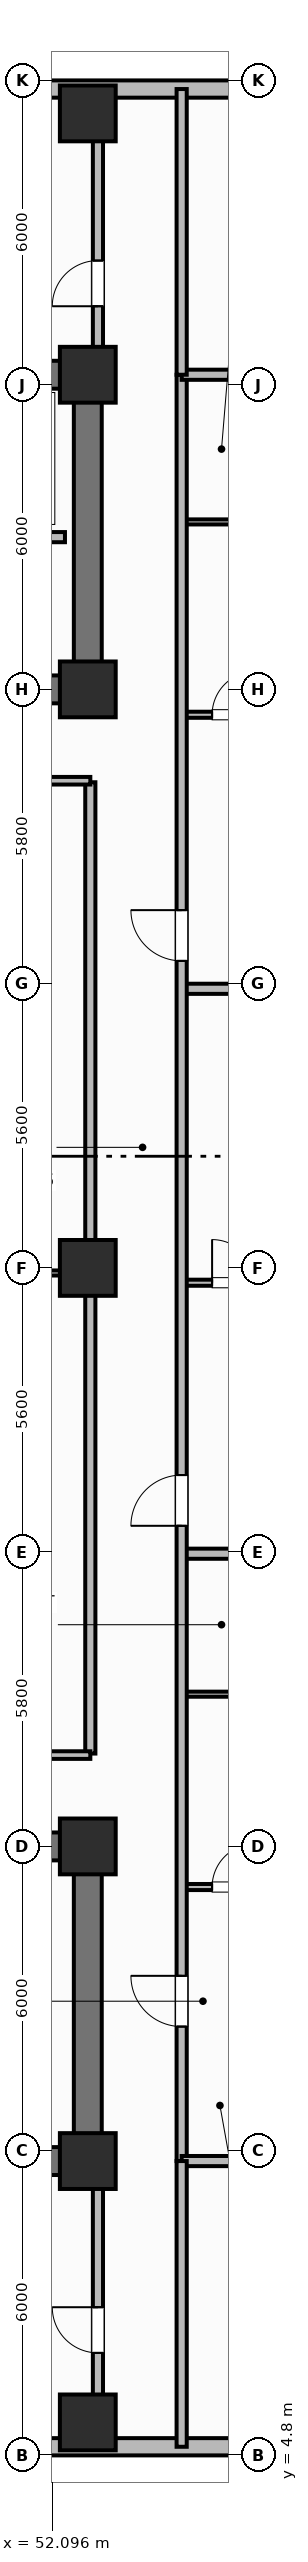
"""IFC4 building model, lengths in metres.
Left out: names, types, materials, properties, quantities, classifications, styles, units other than length and angle.
Written with IfcOpenShell. Run it as: python <this file> out.ifc"""

import sys

from ifc_helpers import new_model, si_unit, direction, frame, frame_2d, origin, origin_2d, place, context, subcontext, project, spatial, rectangle, extrude, element, fill, save


model = new_model("IFC4")
c1 = context("Model", 3, precision=1e-05, world=origin(), true_north=direction((0.0, 1.0)))
c2 = subcontext(c1, "Body", "Model", "MODEL_VIEW")
j1 = project(units=[si_unit("LENGTHUNIT", "METRE"), si_unit("PLANEANGLEUNIT", "RADIAN")], contexts=[c1])
p1 = place(None, origin())
s1 = spatial("IfcSite", under=j1, at=p1, CompositionType="ELEMENT")
p2 = place(p1, origin())
s2 = spatial("IfcBuilding", under=s1, at=p2, CompositionType="ELEMENT")
p3 = place(p2, frame((0.0, 0.0, 125.3)))
s3 = spatial("IfcBuildingStorey", under=s2, at=p3, CompositionType="ELEMENT", Elevation=125.3)
p4 = place(p3, frame((52.8, 10.6, 0.0), z_axis=(0.0, 0.0, 1.0), x_axis=(-1.0, 0.0, 0.0)))
e1 = element("IfcWall", 1, at=p4, inside=s3, PredefinedType="SHEAR", context=c2, shape_type="SweptSolid", body=[
    extrude(rectangle(XDim=27.2, YDim=0.55, at=frame_2d((13.6, 0.0))), origin(), (0.0, 0.0, 1.0), 3.7),
])
p5 = place(p3, frame((52.8, 10.875, 0.0), z_axis=(0.0, 0.0, 1.0), x_axis=(0.0, 1.0, 0.0)))
e2 = element("IfcWall", 2, at=p5, inside=s3, PredefinedType="SHEAR", context=c2, shape_type="SweptSolid", body=[
    extrude(rectangle(XDim=5.65, YDim=0.55, at=frame_2d((2.825, 0.0))), origin(), (0.0, 0.0, 1.0), 3.7),
])
p6 = place(p3, frame((25.6, 16.8, 0.0), z_axis=(0.0, 0.0, 1.0), x_axis=(1.0, 0.0, 0.0)))
e3 = element("IfcWall", 3, at=p6, inside=s3, PredefinedType="SHEAR", context=c2, shape_type="SweptSolid", body=[
    extrude(rectangle(XDim=27.2, YDim=0.55, at=frame_2d((13.6, 0.0))), origin(), (0.0, 0.0, 1.0), 3.7),
])
p7 = place(p6, frame((1.9, 0.0, 0.0)))
e4 = element("IfcOpeningElement", 4, at=p7, cuts=e3, PredefinedType="OPENING", context=c2, shape_type="SweptSolid", body=[
    extrude(rectangle(XDim=1.1, YDim=2.15, at=frame_2d((0.55, 1.075))), frame((0.0, 0.285, 0.0), z_axis=(0.0, -1.0, 0.0), x_axis=(1.0, 0.0, 0.0)), (0.0, 0.0, 1.0), 0.57),
])
p8 = place(p6, frame((13.0, 0.0, 0.0)))
e5 = element("IfcOpeningElement", 5, at=p8, cuts=e3, PredefinedType="OPENING", context=c2, shape_type="SweptSolid", body=[
    extrude(rectangle(XDim=1.2, YDim=2.15, at=frame_2d((0.6, 1.075))), frame((0.0, 0.285, 0.0), z_axis=(0.0, -1.0, 0.0), x_axis=(1.0, 0.0, 0.0)), (0.0, 0.0, 1.0), 0.57),
])
p9 = place(p6, frame((21.6, 0.0, 0.0)))
e6 = element("IfcOpeningElement", 6, at=p9, cuts=e3, PredefinedType="OPENING", context=c2, shape_type="SweptSolid", body=[
    extrude(rectangle(XDim=1.0, YDim=2.15, at=frame_2d((0.5, 1.075))), frame((0.0, 0.285, 0.0), z_axis=(0.0, -1.0, 0.0), x_axis=(1.0, 0.0, 0.0)), (0.0, 0.0, 1.0), 0.57),
])
p10 = place(p3, frame((25.6, 45.8, 0.0), z_axis=(0.0, 0.0, 1.0), x_axis=(1.0, 0.0, 0.0)))
e7 = element("IfcWall", 7, at=p10, inside=s3, PredefinedType="SHEAR", context=c2, shape_type="SweptSolid", body=[
    extrude(rectangle(XDim=27.2, YDim=0.55, at=frame_2d((13.6, 0.0))), origin(), (0.0, 0.0, 1.0), 3.7),
])
p11 = place(p3, frame((52.8, 39.875, 0.0), z_axis=(0.0, 0.0, 1.0), x_axis=(0.0, 1.0, 0.0)))
e8 = element("IfcWall", 8, at=p11, inside=s3, PredefinedType="SHEAR", context=c2, shape_type="SweptSolid", body=[
    extrude(rectangle(XDim=5.65, YDim=0.55, at=frame_2d((2.825, 0.0))), origin(), (0.0, 0.0, 1.0), 3.7),
])
p12 = place(p3, frame((52.8, 39.6, 0.0), z_axis=(0.0, 0.0, 1.0), x_axis=(-1.0, 0.0, 0.0)))
e9 = element("IfcWall", 9, at=p12, inside=s3, PredefinedType="SHEAR", context=c2, shape_type="SweptSolid", body=[
    extrude(rectangle(XDim=27.2, YDim=0.55, at=frame_2d((13.6, 0.0))), origin(), (0.0, 0.0, 1.0), 3.7),
])
p13 = place(p12, frame((24.2, 0.0, 0.0)))
e10 = element("IfcOpeningElement", 10, at=p13, cuts=e9, PredefinedType="OPENING", context=c2, shape_type="SweptSolid", body=[
    extrude(rectangle(XDim=1.1, YDim=2.15, at=frame_2d((0.55, 1.075))), frame((0.0, 0.285, 0.0), z_axis=(0.0, -1.0, 0.0), x_axis=(1.0, 0.0, 0.0)), (0.0, 0.0, 1.0), 0.57),
])
p14 = place(p12, frame((15.1, 0.0, 0.0)))
e11 = element("IfcOpeningElement", 11, at=p14, cuts=e9, PredefinedType="OPENING", context=c2, shape_type="SweptSolid", body=[
    extrude(rectangle(XDim=1.2, YDim=2.15, at=frame_2d((0.6, 1.075))), frame((0.0, 0.285, 0.0), z_axis=(0.0, -1.0, 0.0), x_axis=(1.0, 0.0, 0.0)), (0.0, 0.0, 1.0), 0.57),
])
p15 = place(p12, frame((11.3, 0.0, 0.0)))
e12 = element("IfcOpeningElement", 12, at=p15, cuts=e9, PredefinedType="OPENING", context=c2, shape_type="SweptSolid", body=[
    extrude(rectangle(XDim=1.3, YDim=2.2, at=frame_2d((0.65, 1.1))), frame((0.0, 0.285, 0.0), z_axis=(0.0, -1.0, 0.0), x_axis=(1.0, 0.0, 0.0)), (0.0, 0.0, 1.0), 0.57),
])
p16 = place(p12, frame((7.25, 0.0, 0.0)))
e13 = element("IfcOpeningElement", 13, at=p16, cuts=e9, PredefinedType="OPENING", context=c2, shape_type="SweptSolid", body=[
    extrude(rectangle(XDim=0.85, YDim=2.1, at=frame_2d((0.425, 1.05))), frame((0.0, 0.285, 0.0), z_axis=(0.0, -1.0, 0.0), x_axis=(1.0, 0.0, 0.0)), (0.0, 0.0, 1.0), 0.57),
])
p17 = place(p12, frame((3.0, 0.0, 0.0)))
e14 = element("IfcOpeningElement", 14, at=p17, cuts=e9, PredefinedType="OPENING", context=c2, shape_type="SweptSolid", body=[
    extrude(rectangle(XDim=0.9, YDim=2.1, at=frame_2d((0.45, 1.05))), frame((0.0, 0.285, 0.0), z_axis=(0.0, -1.0, 0.0), x_axis=(1.0, 0.0, 0.0)), (0.0, 0.0, 1.0), 0.57),
])
for number, where, z_axis, x_axis in (
    (15, (52.8, 10.6, 0.0), (0.0, 0.0, 1.0), (1.0, 0.0, 0.0)),
    (16, (52.8, 16.8, 0.0), (0.0, 0.0, 1.0), (1.0, 0.0, 0.0)),
    (17, (52.8, 39.6, 0.0), (0.0, 0.0, 1.0), (1.0, 0.0, 0.0)),
    (18, (52.8, 45.8, 0.0), (0.0, 0.0, 1.0), (1.0, 0.0, 0.0)),
    (19, (52.8, 28.2, 0.0), (0.0, 0.0, 1.0), (1.0, 0.0, 0.0)),
    (20, (52.8, 5.45, 0.0), (0.0, 0.0, 1.0), (1.0, 0.0, 0.0)),
    (21, (52.8, 50.95, 0.0), (0.0, 0.0, 1.0), (1.0, 0.0, 0.0)),
):
    element("IfcColumn", number, at=place(p3, frame(where, z_axis=z_axis, x_axis=x_axis)), inside=s3, PredefinedType="COLUMN", context=c2, shape_type="SweptSolid", body=[
        extrude(rectangle(XDim=1.1, YDim=1.1, at=origin_2d()), origin(), (0.0, 0.0, 1.0), 3.7),
    ])
p18 = place(p3, frame((42.4, 4.97, 0.0), z_axis=(0.0, 0.0, 1.0), x_axis=(1.0, 0.0, 0.0)))
e22 = element("IfcWall", 22, at=p18, inside=s3, PredefinedType="SOLIDWALL", context=c2, shape_type="SweptSolid", body=[
    extrude(rectangle(XDim=17.4, YDim=0.34, at=frame_2d((8.7, 0.0))), origin(), (0.0, 0.0, 1.0), 2.7),
])
p19 = place(p18, frame((5.887, 0.0, 0.68)))
e23 = element("IfcOpeningElement", 23, at=p19, cuts=e22, PredefinedType="OPENING", context=c2, shape_type="SweptSolid", body=[
    extrude(rectangle(XDim=1.6, YDim=1.9, at=frame_2d((0.8, 0.95))), frame((0.0, 0.18, 0.0), z_axis=(0.0, -1.0, 0.0), x_axis=(1.0, 0.0, 0.0)), (0.0, 0.0, 1.0), 0.36),
])
p20 = place(p18, frame((13.938, 0.0, 0.68)))
e24 = element("IfcOpeningElement", 24, at=p20, cuts=e22, PredefinedType="OPENING", context=c2, shape_type="SweptSolid", body=[
    extrude(rectangle(XDim=1.6, YDim=1.9, at=frame_2d((0.8, 0.95))), frame((0.0, 0.18, 0.0), z_axis=(0.0, -1.0, 0.0), x_axis=(1.0, 0.0, 0.0)), (0.0, 0.0, 1.0), 0.36),
])
p21 = place(p3, frame((59.8, 51.43, 0.0), z_axis=(0.0, 0.0, 1.0), x_axis=(-1.0, 0.0, 0.0)))
e25 = element("IfcWall", 25, at=p21, inside=s3, PredefinedType="SOLIDWALL", context=c2, shape_type="SweptSolid", body=[
    extrude(rectangle(XDim=17.4, YDim=0.34, at=frame_2d((8.7, 0.0))), origin(), (0.0, 0.0, 1.0), 2.7),
])
p22 = place(p21, frame((1.613, 0.0, 0.68)))
e26 = element("IfcOpeningElement", 26, at=p22, cuts=e25, PredefinedType="OPENING", context=c2, shape_type="SweptSolid", body=[
    extrude(rectangle(XDim=2.1, YDim=1.9, at=frame_2d((1.05, 0.95))), frame((0.0, 0.18, 0.0), z_axis=(0.0, -1.0, 0.0), x_axis=(1.0, 0.0, 0.0)), (0.0, 0.0, 1.0), 0.36),
])
p23 = place(p21, frame((9.663, 0.0, 0.68)))
e27 = element("IfcOpeningElement", 27, at=p23, cuts=e25, PredefinedType="OPENING", context=c2, shape_type="SweptSolid", body=[
    extrude(rectangle(XDim=2.1, YDim=1.9, at=frame_2d((1.05, 0.95))), frame((0.0, 0.18, 0.0), z_axis=(0.0, -1.0, 0.0), x_axis=(1.0, 0.0, 0.0)), (0.0, 0.0, 1.0), 0.36),
])
p24 = place(p3, frame((52.35, 42.6, 0.0), z_axis=(0.0, 0.0, 1.0), x_axis=(-1.0, 0.0, 0.0)))
e28 = element("IfcWall", 28, at=p24, inside=s3, PredefinedType="PARTITIONING", context=c2, shape_type="SweptSolid", body=[
    extrude(rectangle(XDim=8.8, YDim=0.2, at=frame_2d((4.4, 0.0))), origin(), (0.0, 0.0, 1.0), 2.53),
])
p25 = place(p24, frame((7.1, 0.0, 0.0)))
e29 = element("IfcOpeningElement", 29, at=p25, cuts=e28, PredefinedType="OPENING", context=c2, shape_type="SweptSolid", body=[
    extrude(rectangle(XDim=1.0, YDim=2.15, at=frame_2d((0.5, 1.075))), frame((0.0, 0.11, 0.0), z_axis=(0.0, -1.0, 0.0), x_axis=(1.0, 0.0, 0.0)), (0.0, 0.0, 1.0), 0.22),
])
p26 = place(p3, frame((52.85, 18.63, 0.0), z_axis=(0.0, 0.0, 1.0), x_axis=(0.0, 1.0, 0.0)))
e30 = element("IfcWall", 30, at=p26, inside=s3, PredefinedType="PARTITIONING", context=c2, shape_type="SweptSolid", body=[
    extrude(rectangle(XDim=19.14, YDim=0.2, at=frame_2d((9.57, 0.0))), origin(), (0.0, 0.0, 1.0), 2.53),
])
for number, where, z_axis, x_axis in (
    (31, (46.35, 18.6, 0.0), (0.0, 0.0, 1.0), (1.0, 0.0, 0.0)),
    (32, (46.35, 37.8, 0.0), (0.0, 0.0, 1.0), (1.0, 0.0, 0.0)),
):
    element("IfcWall", number, at=place(p3, frame(where, z_axis=z_axis, x_axis=x_axis)), inside=s3, PredefinedType="PARTITIONING", context=c2, shape_type="SweptSolid", body=[
        extrude(rectangle(XDim=6.5, YDim=0.15, at=frame_2d((3.25, 0.0))), origin(), (0.0, 0.0, 1.0), 2.53),
    ])
p27 = place(p3, frame((46.38, 28.1, 0.0), z_axis=(0.0, 0.0, 1.0), x_axis=(1.0, 0.0, 0.0)))
e33 = element("IfcWall", 33, at=p27, inside=s3, PredefinedType="PARTITIONING", context=c2, shape_type="SweptSolid", body=[
    extrude(rectangle(XDim=6.42, YDim=0.1, at=frame_2d((3.21, 0.0))), origin(), (0.0, 0.0, 1.0), 2.53),
])
p28 = place(p3, frame((54.65, 16.0, 0.0), z_axis=(0.0, 0.0, 1.0), x_axis=(1.0, 0.0, 0.0)))
e34 = element("IfcWall", 34, at=p28, inside=s3, PredefinedType="PARTITIONING", context=c2, shape_type="SweptSolid", body=[
    extrude(rectangle(XDim=2.25, YDim=0.12, at=frame_2d((1.125, 0.0))), origin(), (0.0, 0.0, 1.0), 2.53),
])
p29 = place(p28, frame((0.6, 0.0, 0.0)))
e35 = element("IfcOpeningElement", 35, at=p29, cuts=e34, PredefinedType="OPENING", context=c2, shape_type="SweptSolid", body=[
    extrude(rectangle(XDim=0.85, YDim=2.1, at=frame_2d((0.425, 1.05))), frame((0.0, 0.07, 0.0), z_axis=(0.0, -1.0, 0.0), x_axis=(1.0, 0.0, 0.0)), (0.0, 0.0, 1.0), 0.14),
])
p30 = place(p3, frame((54.65, 19.8, 0.0), z_axis=(0.0, 0.0, 1.0), x_axis=(1.0, 0.0, 0.0)))
e36 = element("IfcWall", 36, at=p30, inside=s3, PredefinedType="PARTITIONING", context=c2, shape_type="SweptSolid", body=[
    extrude(rectangle(XDim=2.25, YDim=0.1, at=frame_2d((1.125, 0.0))), origin(), (0.0, 0.0, 1.0), 2.53),
])
p31 = place(p3, frame((54.65, 22.568, 0.0), z_axis=(0.0, 0.0, 1.0), x_axis=(1.0, 0.0, 0.0)))
e37 = element("IfcWall", 37, at=p31, inside=s3, PredefinedType="PARTITIONING", context=c2, shape_type="SweptSolid", body=[
    extrude(rectangle(XDim=9.18, YDim=0.2, at=frame_2d((4.59, 0.0))), origin(), (0.0, 0.0, 1.0), 2.53),
])
p32 = place(p3, frame((54.65, 27.908, 0.0), z_axis=(0.0, 0.0, 1.0), x_axis=(1.0, 0.0, 0.0)))
e38 = element("IfcWall", 38, at=p32, inside=s3, PredefinedType="PARTITIONING", context=c2, shape_type="SweptSolid", body=[
    extrude(rectangle(XDim=2.25, YDim=0.12, at=frame_2d((1.125, 0.0))), origin(), (0.0, 0.0, 1.0), 2.53),
])
p33 = place(p32, frame((0.6, 0.0, 0.0)))
e39 = element("IfcOpeningElement", 39, at=p33, cuts=e38, PredefinedType="OPENING", context=c2, shape_type="SweptSolid", body=[
    extrude(rectangle(XDim=0.85, YDim=2.1, at=frame_2d((0.425, 1.05))), frame((0.0, 0.07, 0.0), z_axis=(0.0, -1.0, 0.0), x_axis=(1.0, 0.0, 0.0)), (0.0, 0.0, 1.0), 0.14),
])
p34 = place(p3, frame((54.65, 33.7, 0.0), z_axis=(0.0, 0.0, 1.0), x_axis=(1.0, 0.0, 0.0)))
e40 = element("IfcWall", 40, at=p34, inside=s3, PredefinedType="PARTITIONING", context=c2, shape_type="SweptSolid", body=[
    extrude(rectangle(XDim=9.18, YDim=0.2, at=frame_2d((4.59, 0.0))), origin(), (0.0, 0.0, 1.0), 2.53),
])
p35 = place(p3, frame((54.65, 39.1, 0.0), z_axis=(0.0, 0.0, 1.0), x_axis=(1.0, 0.0, 0.0)))
e41 = element("IfcWall", 41, at=p35, inside=s3, PredefinedType="PARTITIONING", context=c2, shape_type="SweptSolid", body=[
    extrude(rectangle(XDim=2.25, YDim=0.12, at=frame_2d((1.125, 0.0))), origin(), (0.0, 0.0, 1.0), 2.53),
])
p36 = place(p35, frame((0.6, 0.0, 0.0)))
e42 = element("IfcOpeningElement", 42, at=p36, cuts=e41, PredefinedType="OPENING", context=c2, shape_type="SweptSolid", body=[
    extrude(rectangle(XDim=0.85, YDim=2.1, at=frame_2d((0.425, 1.05))), frame((0.0, 0.07, 0.0), z_axis=(0.0, -1.0, 0.0), x_axis=(1.0, 0.0, 0.0)), (0.0, 0.0, 1.0), 0.14),
])
p37 = place(p3, frame((54.65, 42.9, 0.0), z_axis=(0.0, 0.0, 1.0), x_axis=(1.0, 0.0, 0.0)))
e43 = element("IfcWall", 43, at=p37, inside=s3, PredefinedType="PARTITIONING", context=c2, shape_type="SweptSolid", body=[
    extrude(rectangle(XDim=2.25, YDim=0.1, at=frame_2d((1.125, 0.0))), origin(), (0.0, 0.0, 1.0), 2.53),
])
p38 = place(p3, frame((54.65, 10.6, 0.0), z_axis=(0.0, 0.0, 1.0), x_axis=(0.0, 1.0, 0.0)))
e44 = element("IfcWall", 44, at=p38, inside=s3, PredefinedType="PARTITIONING", context=c2, shape_type="SweptSolid", body=[
    extrude(rectangle(XDim=35.2, YDim=0.2, at=frame_2d((17.6, 0.0))), origin(), (0.0, 0.0, 1.0), 2.53),
])
p39 = place(p38, frame((2.65, 0.0, 0.0)))
e45 = element("IfcOpeningElement", 45, at=p39, cuts=e44, PredefinedType="OPENING", context=c2, shape_type="SweptSolid", body=[
    extrude(rectangle(XDim=1.0, YDim=2.15, at=frame_2d((0.5, 1.075))), frame((0.0, 0.11, 0.0), z_axis=(0.0, -1.0, 0.0), x_axis=(1.0, 0.0, 0.0)), (0.0, 0.0, 1.0), 0.22),
])
p40 = place(p38, frame((12.518, 0.0, 0.0)))
e46 = element("IfcOpeningElement", 46, at=p40, cuts=e44, PredefinedType="OPENING", context=c2, shape_type="SweptSolid", body=[
    extrude(rectangle(XDim=1.0, YDim=2.15, at=frame_2d((0.5, 1.075))), frame((0.0, 0.11, 0.0), z_axis=(0.0, -1.0, 0.0), x_axis=(1.0, 0.0, 0.0)), (0.0, 0.0, 1.0), 0.22),
])
p41 = place(p38, frame((23.65, 0.0, 0.0)))
e47 = element("IfcOpeningElement", 47, at=p41, cuts=e44, PredefinedType="OPENING", context=c2, shape_type="SweptSolid", body=[
    extrude(rectangle(XDim=1.0, YDim=2.15, at=frame_2d((0.5, 1.075))), frame((0.0, 0.11, 0.0), z_axis=(0.0, -1.0, 0.0), x_axis=(1.0, 0.0, 0.0)), (0.0, 0.0, 1.0), 0.22),
])
for number, where, z_axis, x_axis in (
    (48, (54.65, 10.6, 0.0), (0.0, 0.0, 1.0), (1.0, 0.0, 0.0)),
    (49, (54.65, 45.8, 0.0), (0.0, 0.0, 1.0), (1.0, 0.0, 0.0)),
):
    element("IfcWall", number, at=place(p3, frame(where, z_axis=z_axis, x_axis=x_axis)), inside=s3, PredefinedType="PARTITIONING", context=c2, shape_type="SweptSolid", body=[
        extrude(rectangle(XDim=8.76, YDim=0.2, at=frame_2d((4.38, 0.0))), origin(), (0.0, 0.0, 1.0), 2.53),
    ])
p42 = place(p3, frame((54.65, 4.97, 0.0), z_axis=(0.0, 0.0, 1.0), x_axis=(0.0, 1.0, 0.0)))
e50 = element("IfcWall", 50, at=p42, inside=s3, PredefinedType="PARTITIONING", context=c2, shape_type="SweptSolid", body=[
    extrude(rectangle(XDim=5.63, YDim=0.2, at=frame_2d((2.815, 0.0))), origin(), (0.0, 0.0, 1.0), 2.53),
])
p43 = place(p3, frame((54.65, 45.8, 0.0), z_axis=(0.0, 0.0, 1.0), x_axis=(0.0, 1.0, 0.0)))
e51 = element("IfcWall", 51, at=p43, inside=s3, PredefinedType="PARTITIONING", context=c2, shape_type="SweptSolid", body=[
    extrude(rectangle(XDim=5.63, YDim=0.2, at=frame_2d((2.815, 0.0))), origin(), (0.0, 0.0, 1.0), 2.53),
])
p44 = place(p3, frame((53.0, 5.77, 0.0), z_axis=(0.0, 0.0, 1.0), x_axis=(0.0, 1.0, 0.0)))
e52 = element("IfcWall", 52, at=p44, inside=s3, PredefinedType="PARTITIONING", context=c2, shape_type="SweptSolid", body=[
    extrude(rectangle(XDim=4.53, YDim=0.2, at=frame_2d((2.265, 0.0))), origin(), (0.0, 0.0, 1.0), 2.53),
])
p45 = place(p44, frame((1.05, 0.0, 0.0)))
e53 = element("IfcOpeningElement", 53, at=p45, cuts=e52, PredefinedType="OPENING", context=c2, shape_type="SweptSolid", body=[
    extrude(rectangle(XDim=0.9, YDim=2.1, at=frame_2d((0.45, 1.05))), frame((0.0, 0.11, 0.0), z_axis=(0.0, -1.0, 0.0), x_axis=(1.0, 0.0, 0.0)), (0.0, 0.0, 1.0), 0.22),
])
p46 = place(p3, frame((53.0, 46.1, 0.0), z_axis=(0.0, 0.0, 1.0), x_axis=(0.0, 1.0, 0.0)))
e54 = element("IfcWall", 54, at=p46, inside=s3, PredefinedType="PARTITIONING", context=c2, shape_type="SweptSolid", body=[
    extrude(rectangle(XDim=4.53, YDim=0.2, at=frame_2d((2.265, 0.0))), origin(), (0.0, 0.0, 1.0), 2.53),
])
p47 = place(p46, frame((1.05, 0.0, 0.0)))
e55 = element("IfcOpeningElement", 55, at=p47, cuts=e54, PredefinedType="OPENING", context=c2, shape_type="SweptSolid", body=[
    extrude(rectangle(XDim=0.9, YDim=2.1, at=frame_2d((0.45, 1.05))), frame((0.0, 0.11, 0.0), z_axis=(0.0, -1.0, 0.0), x_axis=(1.0, 0.0, 0.0)), (0.0, 0.0, 1.0), 0.22),
])
p48 = place(p29, origin())
e56 = element("IfcDoor", 56, at=p48, inside=s3, OperationType="SINGLE_SWING_RIGHT", PredefinedType="DOOR", context=c2, shape_type="SweptSolid", body=[
    extrude(rectangle(XDim=0.85, YDim=2.1, at=frame_2d((0.425, 1.05))), frame((0.0, 0.025, 0.0), z_axis=(0.0, -1.0, 0.0), x_axis=(1.0, 0.0, 0.0)), (0.0, 0.0, 1.0), 0.05),
])
fill(e35, e56)
p49 = place(p33, origin())
e57 = element("IfcDoor", 57, at=p49, inside=s3, OperationType="SINGLE_SWING_LEFT", PredefinedType="DOOR", context=c2, shape_type="SweptSolid", body=[
    extrude(rectangle(XDim=0.85, YDim=2.1, at=frame_2d((0.425, 1.05))), frame((0.0, 0.025, 0.0), z_axis=(0.0, -1.0, 0.0), x_axis=(1.0, 0.0, 0.0)), (0.0, 0.0, 1.0), 0.05),
])
fill(e39, e57)
p50 = place(p36, origin())
e58 = element("IfcDoor", 58, at=p50, inside=s3, OperationType="SINGLE_SWING_RIGHT", PredefinedType="DOOR", context=c2, shape_type="SweptSolid", body=[
    extrude(rectangle(XDim=0.85, YDim=2.1, at=frame_2d((0.425, 1.05))), frame((0.0, 0.025, 0.0), z_axis=(0.0, -1.0, 0.0), x_axis=(1.0, 0.0, 0.0)), (0.0, 0.0, 1.0), 0.05),
])
fill(e42, e58)
p51 = place(p39, origin())
e59 = element("IfcDoor", 59, at=p51, inside=s3, OperationType="SINGLE_SWING_RIGHT", PredefinedType="DOOR", context=c2, shape_type="SweptSolid", body=[
    extrude(rectangle(XDim=1.0, YDim=2.15, at=frame_2d((0.5, 1.075))), frame((0.0, 0.025, 0.0), z_axis=(0.0, -1.0, 0.0), x_axis=(1.0, 0.0, 0.0)), (0.0, 0.0, 1.0), 0.05),
])
fill(e45, e59)
p52 = place(p40, origin())
e60 = element("IfcDoor", 60, at=p52, inside=s3, OperationType="SINGLE_SWING_LEFT", PredefinedType="DOOR", context=c2, shape_type="SweptSolid", body=[
    extrude(rectangle(XDim=1.0, YDim=2.15, at=frame_2d((0.5, 1.075))), frame((0.0, 0.025, 0.0), z_axis=(0.0, -1.0, 0.0), x_axis=(1.0, 0.0, 0.0)), (0.0, 0.0, 1.0), 0.05),
])
fill(e46, e60)
p53 = place(p41, origin())
e61 = element("IfcDoor", 61, at=p53, inside=s3, OperationType="SINGLE_SWING_RIGHT", PredefinedType="DOOR", context=c2, shape_type="SweptSolid", body=[
    extrude(rectangle(XDim=1.0, YDim=2.15, at=frame_2d((0.5, 1.075))), frame((0.0, 0.025, 0.0), z_axis=(0.0, -1.0, 0.0), x_axis=(1.0, 0.0, 0.0)), (0.0, 0.0, 1.0), 0.05),
])
fill(e47, e61)
p54 = place(p45, origin())
e62 = element("IfcDoor", 62, at=p54, inside=s3, OperationType="SINGLE_SWING_RIGHT", PredefinedType="DOOR", context=c2, shape_type="SweptSolid", body=[
    extrude(rectangle(XDim=0.9, YDim=2.1, at=frame_2d((0.45, 1.05))), frame((0.0, 0.025, 0.0), z_axis=(0.0, -1.0, 0.0), x_axis=(1.0, 0.0, 0.0)), (0.0, 0.0, 1.0), 0.05),
])
fill(e53, e62)
p55 = place(p47, origin())
e63 = element("IfcDoor", 63, at=p55, inside=s3, OperationType="SINGLE_SWING_LEFT", PredefinedType="DOOR", context=c2, shape_type="SweptSolid", body=[
    extrude(rectangle(XDim=0.9, YDim=2.1, at=frame_2d((0.45, 1.05))), frame((0.0, 0.025, 0.0), z_axis=(0.0, -1.0, 0.0), x_axis=(1.0, 0.0, 0.0)), (0.0, 0.0, 1.0), 0.05),
])
fill(e55, e63)
save(model, sys.argv[1])
